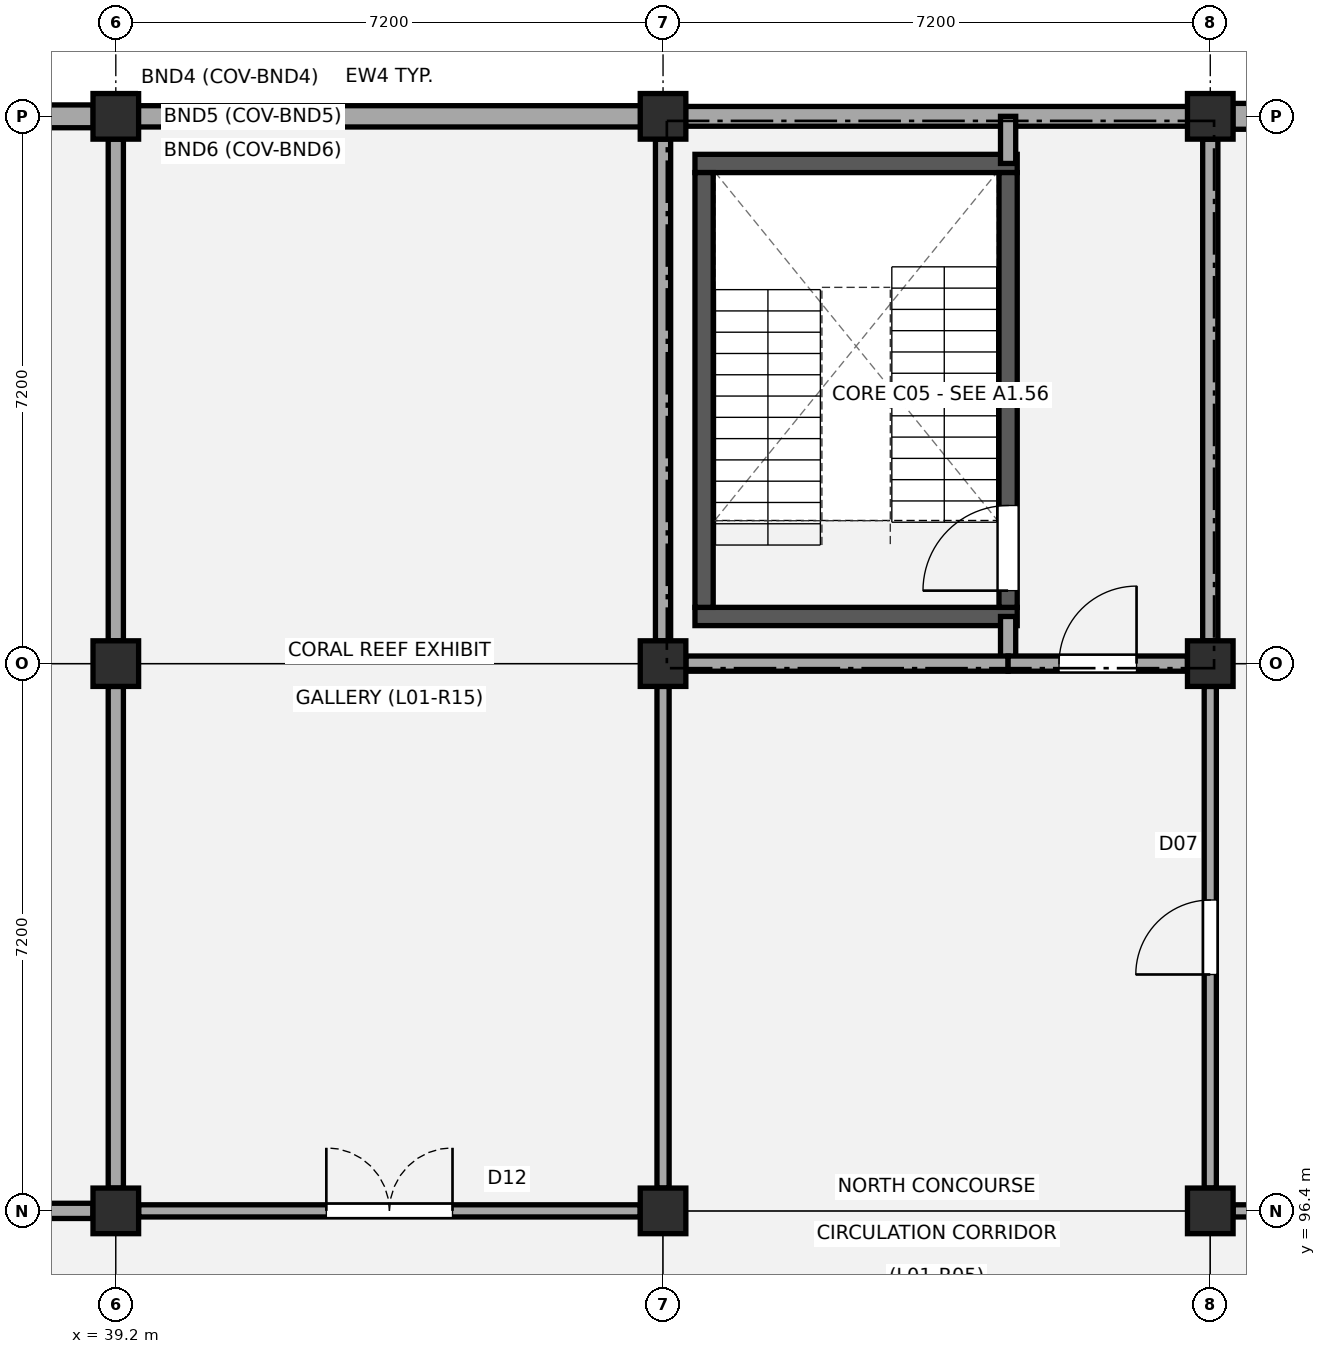
"""IFC4 building model, lengths in metres.
Left out: names, types, materials, properties, quantities, classifications, styles, units other than length and angle.
Written with IfcOpenShell. Run it as: python <this file> out.ifc"""

import sys

from ifc_helpers import new_model, si_unit, direction, frame, frame_2d, origin, origin_2d, place, context, subcontext, project, spatial, rectangle, extrude, element, fill, save


model = new_model("IFC4")
c1 = context("Model", 3, precision=1e-05, world=origin(), true_north=direction((0.0, 1.0)))
c2 = subcontext(c1, "Body", "Model", "MODEL_VIEW")
j1 = project(units=[si_unit("LENGTHUNIT", "METRE"), si_unit("PLANEANGLEUNIT", "RADIAN")], contexts=[c1])
p1 = place(None, origin())
s1 = spatial("IfcSite", under=j1, at=p1, CompositionType="ELEMENT")
p2 = place(p1, origin())
s2 = spatial("IfcBuilding", under=s1, at=p2, CompositionType="ELEMENT")
p3 = place(p2, frame((0.0, 0.0, 4.68)))
s3 = spatial("IfcBuildingStorey", under=s2, at=p3, CompositionType="ELEMENT", Elevation=4.68)
for number, where, z_axis, x_axis in (
    (1, (39.2, 96.4, 0.0), (0.0, 0.0, 1.0), (1.0, 0.0, 0.0)),
    (2, (39.2, 103.6, 0.0), (0.0, 0.0, 1.0), (1.0, 0.0, 0.0)),
    (3, (39.2, 110.8, 0.0), (0.0, 0.0, 1.0), (1.0, 0.0, 0.0)),
    (4, (46.4, 96.4, 0.0), (0.0, 0.0, 1.0), (1.0, 0.0, 0.0)),
    (5, (46.4, 103.6, 0.0), (0.0, 0.0, 1.0), (1.0, 0.0, 0.0)),
    (6, (46.4, 110.8, 0.0), (0.0, 0.0, 1.0), (1.0, 0.0, 0.0)),
    (7, (53.6, 96.4, 0.0), (0.0, 0.0, 1.0), (1.0, 0.0, 0.0)),
    (8, (53.6, 103.6, 0.0), (0.0, 0.0, 1.0), (1.0, 0.0, 0.0)),
    (9, (53.6, 110.8, 0.0), (0.0, 0.0, 1.0), (1.0, 0.0, 0.0)),
):
    element("IfcColumn", number, at=place(p3, frame(where, z_axis=z_axis, x_axis=x_axis)), inside=s3, PredefinedType="COLUMN", context=c2, shape_type="SweptSolid", body=[
        extrude(rectangle(XDim=0.6, YDim=0.6, at=origin_2d()), origin(), (0.0, 0.0, 1.0), 4.5),
    ])
p4 = place(p3, frame((32.295, 110.8, 0.0), z_axis=(0.0, 0.0, 1.0), x_axis=(1.0, 0.0, 0.0)))
e10 = element("IfcWall", 10, at=p4, inside=s3, PredefinedType="STANDARD", context=c2, shape_type="SweptSolid", body=[
    extrude(rectangle(XDim=6.61, YDim=0.3, at=frame_2d((3.305, 0.0))), origin(), (0.0, 0.0, 1.0), 3.49),
])
p5 = place(p3, frame((39.495, 110.8, 0.0), z_axis=(0.0, 0.0, 1.0), x_axis=(1.0, 0.0, 0.0)))
e11 = element("IfcWall", 11, at=p5, inside=s3, PredefinedType="STANDARD", context=c2, shape_type="SweptSolid", body=[
    extrude(rectangle(XDim=6.61, YDim=0.28, at=frame_2d((3.305, 0.0))), origin(), (0.0, 0.0, 1.0), 3.51),
])
p6 = place(p3, frame((46.695, 110.8, 0.0), z_axis=(0.0, 0.0, 1.0), x_axis=(1.0, 0.0, 0.0)))
e12 = element("IfcWall", 12, at=p6, inside=s3, PredefinedType="STANDARD", context=c2, shape_type="SweptSolid", body=[
    extrude(rectangle(XDim=6.61, YDim=0.26, at=frame_2d((3.305, 0.0))), origin(), (0.0, 0.0, 1.0), 3.49),
])
p7 = place(p3, frame((53.895, 110.8, 0.0), z_axis=(0.0, 0.0, 1.0), x_axis=(1.0, 0.0, 0.0)))
e13 = element("IfcWall", 13, at=p7, inside=s3, PredefinedType="STANDARD", context=c2, shape_type="SweptSolid", body=[
    extrude(rectangle(XDim=6.61, YDim=0.34, at=frame_2d((3.305, 0.0))), origin(), (0.0, 0.0, 1.0), 3.51),
])
for number, where, z_axis, x_axis in (
    (14, (46.82, 104.22, 0.0), (0.0, 0.0, 1.0), (1.0, 0.0, 0.0)),
    (15, (46.82, 110.18, 0.0), (0.0, 0.0, 1.0), (1.0, 0.0, 0.0)),
):
    element("IfcWall", number, at=place(p3, frame(where, z_axis=z_axis, x_axis=x_axis)), inside=s3, PredefinedType="SHEAR", context=c2, shape_type="SweptSolid", body=[
        extrude(rectangle(XDim=4.24, YDim=0.24, at=frame_2d((2.12, 0.0))), origin(), (0.0, 0.0, 1.0), 4.2),
    ])
p8 = place(p3, frame((46.94, 104.34, 0.0), z_axis=(0.0, 0.0, 1.0), x_axis=(0.0, 1.0, 0.0)))
e16 = element("IfcWall", 16, at=p8, inside=s3, PredefinedType="SHEAR", context=c2, shape_type="SweptSolid", body=[
    extrude(rectangle(XDim=5.72, YDim=0.24, at=frame_2d((2.86, 0.0))), origin(), (0.0, 0.0, 1.0), 4.2),
])
p9 = place(p3, frame((50.94, 104.34, 0.0), z_axis=(0.0, 0.0, 1.0), x_axis=(0.0, 1.0, 0.0)))
e17 = element("IfcWall", 17, at=p9, inside=s3, PredefinedType="SHEAR", context=c2, shape_type="SweptSolid", body=[
    extrude(rectangle(XDim=5.72, YDim=0.24, at=frame_2d((2.86, 0.0))), origin(), (0.0, 0.0, 1.0), 4.2),
])
p10 = place(p9, frame((0.22, 0.0, 0.0)))
e18 = element("IfcOpeningElement", 18, at=p10, cuts=e17, PredefinedType="OPENING", context=c2, shape_type="SweptSolid", body=[
    extrude(rectangle(XDim=1.12, YDim=2.15, at=frame_2d((0.56, 1.075))), frame((0.0, 0.13, 0.0), z_axis=(0.0, -1.0, 0.0), x_axis=(1.0, 0.0, 0.0)), (0.0, 0.0, 1.0), 0.26),
])
p11 = place(p3, frame((50.94, 103.6, 0.0), z_axis=(0.0, 0.0, 1.0), x_axis=(0.0, 1.0, 0.0)))
e19 = element("IfcWall", 19, at=p11, inside=s3, PredefinedType="PARTITIONING", context=c2, shape_type="SweptSolid", body=[
    extrude(rectangle(XDim=0.62, YDim=0.2, at=frame_2d((0.31, 0.0))), origin(), (0.0, 0.0, 1.0), 3.54),
])
p12 = place(p3, frame((50.94, 110.18, 0.0), z_axis=(0.0, 0.0, 1.0), x_axis=(0.0, 1.0, 0.0)))
e20 = element("IfcWall", 20, at=p12, inside=s3, PredefinedType="PARTITIONING", context=c2, shape_type="SweptSolid", body=[
    extrude(rectangle(XDim=0.62, YDim=0.2, at=frame_2d((0.31, 0.0))), origin(), (0.0, 0.0, 1.0), 3.49),
])
for number, where, z_axis, x_axis in (
    (21, (46.4, 103.9, 0.0), (0.0, 0.0, 1.0), (0.0, 1.0, 0.0)),
    (22, (53.6, 103.9, 0.0), (0.0, 0.0, 1.0), (0.0, 1.0, 0.0)),
):
    element("IfcWall", number, at=place(p3, frame(where, z_axis=z_axis, x_axis=x_axis)), inside=s3, PredefinedType="PARTITIONING", context=c2, shape_type="SweptSolid", body=[
        extrude(rectangle(XDim=6.6, YDim=0.2, at=frame_2d((3.3, 0.0))), origin(), (0.0, 0.0, 1.0), 3.54),
    ])
p13 = place(p3, frame((46.7, 103.6, 0.0), z_axis=(0.0, 0.0, 1.0), x_axis=(1.0, 0.0, 0.0)))
e23 = element("IfcWall", 23, at=p13, inside=s3, PredefinedType="PARTITIONING", context=c2, shape_type="SweptSolid", body=[
    extrude(rectangle(XDim=4.24, YDim=0.2, at=frame_2d((2.12, 0.0))), origin(), (0.0, 0.0, 1.0), 3.54),
])
p14 = place(p3, frame((50.94, 103.6, 0.0), z_axis=(0.0, 0.0, 1.0), x_axis=(1.0, 0.0, 0.0)))
e24 = element("IfcWall", 24, at=p14, inside=s3, PredefinedType="PARTITIONING", context=c2, shape_type="SweptSolid", body=[
    extrude(rectangle(XDim=2.36, YDim=0.2, at=frame_2d((1.18, 0.0))), origin(), (0.0, 0.0, 1.0), 3.54),
])
p15 = place(p14, frame((0.67, 0.0, 0.0)))
e25 = element("IfcOpeningElement", 25, at=p15, cuts=e24, PredefinedType="OPENING", context=c2, shape_type="SweptSolid", body=[
    extrude(rectangle(XDim=1.02, YDim=2.15, at=frame_2d((0.51, 1.075))), frame((0.0, 0.11, 0.0), z_axis=(0.0, -1.0, 0.0), x_axis=(1.0, 0.0, 0.0)), (0.0, 0.0, 1.0), 0.22),
])
p16 = place(p3, frame((32.3, 96.4, 0.0), z_axis=(0.0, 0.0, 1.0), x_axis=(1.0, 0.0, 0.0)))
e26 = element("IfcWall", 26, at=p16, inside=s3, PredefinedType="PARTITIONING", context=c2, shape_type="SweptSolid", body=[
    extrude(rectangle(XDim=6.6, YDim=0.2, at=frame_2d((3.3, 0.0))), origin(), (0.0, 0.0, 1.0), 3.59),
])
p17 = place(p3, frame((39.2, 96.7, 0.0), z_axis=(0.0, 0.0, 1.0), x_axis=(0.0, 1.0, 0.0)))
e27 = element("IfcWall", 27, at=p17, inside=s3, PredefinedType="PARTITIONING", context=c2, shape_type="SweptSolid", body=[
    extrude(rectangle(XDim=6.6, YDim=0.2, at=frame_2d((3.3, 0.0))), origin(), (0.0, 0.0, 1.0), 3.59),
])
p18 = place(p3, frame((39.2, 103.9, 0.0), z_axis=(0.0, 0.0, 1.0), x_axis=(0.0, 1.0, 0.0)))
e28 = element("IfcWall", 28, at=p18, inside=s3, PredefinedType="PARTITIONING", context=c2, shape_type="SweptSolid", body=[
    extrude(rectangle(XDim=6.6, YDim=0.2, at=frame_2d((3.3, 0.0))), origin(), (0.0, 0.0, 1.0), 3.54),
])
p19 = place(p3, frame((39.5, 96.4, 0.0), z_axis=(0.0, 0.0, 1.0), x_axis=(1.0, 0.0, 0.0)))
e29 = element("IfcWall", 29, at=p19, inside=s3, PredefinedType="PARTITIONING", context=c2, shape_type="SweptSolid", body=[
    extrude(rectangle(XDim=6.6, YDim=0.16, at=frame_2d((3.3, 0.0))), origin(), (0.0, 0.0, 1.0), 3.54),
])
p20 = place(p19, frame((2.47, 0.0, 0.0)))
e30 = element("IfcOpeningElement", 30, at=p20, cuts=e29, PredefinedType="OPENING", context=c2, shape_type="SweptSolid", body=[
    extrude(rectangle(XDim=1.66, YDim=2.22, at=frame_2d((0.83, 1.11))), frame((0.0, 0.09, 0.0), z_axis=(0.0, -1.0, 0.0), x_axis=(1.0, 0.0, 0.0)), (0.0, 0.0, 1.0), 0.18),
])
p21 = place(p3, frame((46.4, 96.7, 0.0), z_axis=(0.0, 0.0, 1.0), x_axis=(0.0, 1.0, 0.0)))
e31 = element("IfcWall", 31, at=p21, inside=s3, PredefinedType="PARTITIONING", context=c2, shape_type="SweptSolid", body=[
    extrude(rectangle(XDim=6.6, YDim=0.16, at=frame_2d((3.3, 0.0))), origin(), (0.0, 0.0, 1.0), 3.59),
])
p22 = place(p3, frame((53.6, 96.7, 0.0), z_axis=(0.0, 0.0, 1.0), x_axis=(0.0, 1.0, 0.0)))
e32 = element("IfcWall", 32, at=p22, inside=s3, PredefinedType="PARTITIONING", context=c2, shape_type="SweptSolid", body=[
    extrude(rectangle(XDim=6.6, YDim=0.16, at=frame_2d((3.3, 0.0))), origin(), (0.0, 0.0, 1.0), 3.59),
])
p23 = place(p22, frame((2.81, 0.0, 0.0)))
e33 = element("IfcOpeningElement", 33, at=p23, cuts=e32, PredefinedType="OPENING", context=c2, shape_type="SweptSolid", body=[
    extrude(rectangle(XDim=0.98, YDim=2.12, at=frame_2d((0.49, 1.06))), frame((0.0, 0.09, 0.0), z_axis=(0.0, -1.0, 0.0), x_axis=(1.0, 0.0, 0.0)), (0.0, 0.0, 1.0), 0.18),
])
p24 = place(p3, frame((53.9, 96.4, 0.0), z_axis=(0.0, 0.0, 1.0), x_axis=(1.0, 0.0, 0.0)))
e34 = element("IfcWall", 34, at=p24, inside=s3, PredefinedType="PARTITIONING", context=c2, shape_type="SweptSolid", body=[
    extrude(rectangle(XDim=6.6, YDim=0.16, at=frame_2d((3.3, 0.0))), origin(), (0.0, 0.0, 1.0), 3.54),
])
p25 = place(p10, origin())
e35 = element("IfcDoor", 35, at=p25, inside=s3, OperationType="SINGLE_SWING_LEFT", PredefinedType="DOOR", context=c2, shape_type="SweptSolid", body=[
    extrude(rectangle(XDim=1.12, YDim=2.15, at=frame_2d((0.56, 1.075))), frame((0.0, 0.025, 0.0), z_axis=(0.0, -1.0, 0.0), x_axis=(1.0, 0.0, 0.0)), (0.0, 0.0, 1.0), 0.05),
])
fill(e18, e35)
p26 = place(p15, origin())
e36 = element("IfcDoor", 36, at=p26, inside=s3, OperationType="SINGLE_SWING_RIGHT", PredefinedType="DOOR", context=c2, shape_type="SweptSolid", body=[
    extrude(rectangle(XDim=1.02, YDim=2.15, at=frame_2d((0.51, 1.075))), frame((0.0, 0.025, 0.0), z_axis=(0.0, -1.0, 0.0), x_axis=(1.0, 0.0, 0.0)), (0.0, 0.0, 1.0), 0.05),
])
fill(e25, e36)
p27 = place(p20, origin())
e37 = element("IfcDoor", 37, at=p27, inside=s3, OperationType="DOUBLE_DOOR_SINGLE_SWING", PredefinedType="DOOR", context=c2, shape_type="SweptSolid", body=[
    extrude(rectangle(XDim=1.66, YDim=2.22, at=frame_2d((0.83, 1.11))), frame((0.0, 0.025, 0.0), z_axis=(0.0, -1.0, 0.0), x_axis=(1.0, 0.0, 0.0)), (0.0, 0.0, 1.0), 0.05),
])
fill(e30, e37)
p28 = place(p23, origin())
e38 = element("IfcDoor", 38, at=p28, inside=s3, OperationType="SINGLE_SWING_LEFT", PredefinedType="DOOR", context=c2, shape_type="SweptSolid", body=[
    extrude(rectangle(XDim=0.98, YDim=2.12, at=frame_2d((0.49, 1.06))), frame((0.0, 0.025, 0.0), z_axis=(0.0, -1.0, 0.0), x_axis=(1.0, 0.0, 0.0)), (0.0, 0.0, 1.0), 0.05),
])
fill(e33, e38)
save(model, sys.argv[1])
